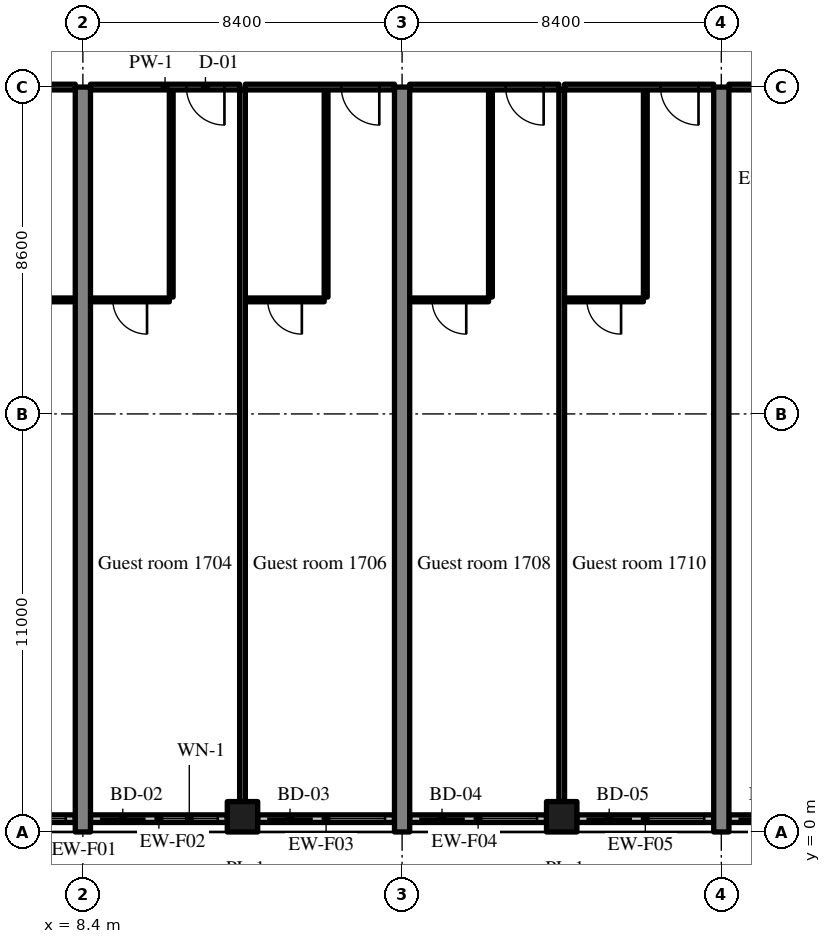
"""IFC4 building model, lengths in metres.
Left out: names, types, materials, properties, quantities, classifications, styles, units other than length and angle.
Written with IfcOpenShell. Run it as: python <this file> out.ifc"""

import sys

from ifc_helpers import new_model, si_unit, direction, frame, frame_2d, origin, origin_2d, place, context, subcontext, project, spatial, rectangle, extrude, source, transform, mapped, element, fill, save


model = new_model("IFC4")
c1 = context("Model", 3, precision=1e-05, world=origin(), true_north=direction((0.0, 1.0)))
c2 = subcontext(c1, "Body", "Model", "MODEL_VIEW")
j1 = project(units=[si_unit("LENGTHUNIT", "METRE"), si_unit("PLANEANGLEUNIT", "RADIAN")], contexts=[c1])
p1 = place(None, origin())
s1 = spatial("IfcSite", under=j1, at=p1, CompositionType="ELEMENT")
p2 = place(p1, origin())
s2 = spatial("IfcBuilding", under=s1, at=p2, CompositionType="ELEMENT")
p3 = place(p2, frame((0.0, 0.0, 73.4)))
s3 = spatial("IfcBuildingStorey", under=s2, at=p3, CompositionType="ELEMENT", Elevation=73.4)
m1 = source(origin(), c2, "Body", "SweptSolid", [
    extrude(rectangle(XDim=19.6, YDim=0.4, at=frame_2d((9.8, 0.0))), origin(), (0.0, 0.0, 1.0), 3.52),
])
for number, where, z_axis, x_axis in (
    (1, (8.4, 0.0, 0.0), (0.0, 0.0, 1.0), (0.0, 1.0, 0.0)),
    (2, (16.8, 0.0, 0.0), (0.0, 0.0, 1.0), (0.0, 1.0, 0.0)),
    (3, (25.2, 0.0, 0.0), (0.0, 0.0, 1.0), (0.0, 1.0, 0.0)),
):
    element("IfcWall", number, at=place(p3, frame(where, z_axis=z_axis, x_axis=x_axis)), inside=s3, PredefinedType="SHEAR", context=c2, shape_type="MappedRepresentation", body=[
        mapped(m1, transform((0.0, 0.0, 0.0), scale=1.0)),
    ])
m2 = source(origin(), c2, "Body", "SweptSolid", [
    extrude(rectangle(XDim=0.8, YDim=0.8, at=origin_2d()), origin(), (0.0, 0.0, 1.0), 3.52),
])
for number, where, z_axis, x_axis in (
    (4, (12.6, 0.4, 0.0), (0.0, 0.0, 1.0), (1.0, 0.0, 0.0)),
    (5, (21.0, 0.4, 0.0), (0.0, 0.0, 1.0), (1.0, 0.0, 0.0)),
):
    element("IfcColumn", number, at=place(p3, frame(where, z_axis=z_axis, x_axis=x_axis)), inside=s3, PredefinedType="COLUMN", context=c2, shape_type="MappedRepresentation", body=[
        mapped(m2, transform((0.0, 0.0, 0.0), scale=1.0)),
    ])
m3 = source(origin(), c2, "Body", "SweptSolid", [
    extrude(rectangle(XDim=4.055, YDim=0.2, at=frame_2d((2.027, 0.0))), origin(), (0.0, 0.0, 1.0), 2.82),
])
p4 = place(p3, frame((4.145, 0.35, 0.0), z_axis=(0.0, 0.0, 1.0), x_axis=(1.0, 0.0, 0.0)))
e6 = element("IfcWall", 6, at=p4, inside=s3, PredefinedType="SOLIDWALL", context=c2, shape_type="MappedRepresentation", body=[
    mapped(m3, transform((0.0, 0.0, 0.0), scale=1.0)),
])
m4 = source(origin(), c2, "Body", "SweptSolid", [
    extrude(rectangle(XDim=1.2, YDim=2.4, at=frame_2d((0.6, 1.2))), frame((0.0, 0.11, 0.0), z_axis=(0.0, -1.0, 0.0), x_axis=(1.0, 0.0, 0.0)), (0.0, 0.0, 1.0), 0.22),
])
p5 = place(p4, frame((0.25, 0.0, 0.0)))
e7 = element("IfcOpeningElement", 7, at=p5, cuts=e6, PredefinedType="OPENING", context=c2, shape_type="MappedRepresentation", body=[
    mapped(m4, transform((0.0, 0.0, 0.0), scale=1.0)),
])
m5 = source(origin(), c2, "Body", "SweptSolid", [
    extrude(rectangle(XDim=1.5, YDim=1.5, at=frame_2d((0.75, 0.75))), frame((0.0, 0.11, 0.0), z_axis=(0.0, -1.0, 0.0), x_axis=(1.0, 0.0, 0.0)), (0.0, 0.0, 1.0), 0.22),
])
p6 = place(p4, frame((2.305, 0.0, 0.9)))
e8 = element("IfcOpeningElement", 8, at=p6, cuts=e6, PredefinedType="OPENING", context=c2, shape_type="MappedRepresentation", body=[
    mapped(m5, transform((0.0, 0.0, 0.0), scale=1.0)),
])
m6 = source(origin(), c2, "Body", "SweptSolid", [
    extrude(rectangle(XDim=3.6, YDim=0.2, at=frame_2d((1.8, 0.0))), origin(), (0.0, 0.0, 1.0), 2.82),
])
p7 = place(p3, frame((8.6, 0.35, 0.0), z_axis=(0.0, 0.0, 1.0), x_axis=(1.0, 0.0, 0.0)))
e9 = element("IfcWall", 9, at=p7, inside=s3, PredefinedType="SOLIDWALL", context=c2, shape_type="MappedRepresentation", body=[
    mapped(m6, transform((0.0, 0.0, 0.0), scale=1.0)),
])
p8 = place(p7, frame((0.25, 0.0, 0.0)))
e10 = element("IfcOpeningElement", 10, at=p8, cuts=e9, PredefinedType="OPENING", context=c2, shape_type="MappedRepresentation", body=[
    mapped(m4, transform((0.0, 0.0, 0.0), scale=1.0)),
])
p9 = place(p7, frame((1.85, 0.0, 0.9)))
e11 = element("IfcOpeningElement", 11, at=p9, cuts=e9, PredefinedType="OPENING", context=c2, shape_type="MappedRepresentation", body=[
    mapped(m5, transform((0.0, 0.0, 0.0), scale=1.0)),
])
m7 = source(origin(), c2, "Body", "SweptSolid", [
    extrude(rectangle(XDim=3.6, YDim=0.2, at=frame_2d((1.8, 0.0))), origin(), (0.0, 0.0, 1.0), 2.82),
])
p10 = place(p3, frame((13.0, 0.35, 0.0), z_axis=(0.0, 0.0, 1.0), x_axis=(1.0, 0.0, 0.0)))
e12 = element("IfcWall", 12, at=p10, inside=s3, PredefinedType="SOLIDWALL", context=c2, shape_type="MappedRepresentation", body=[
    mapped(m7, transform((0.0, 0.0, 0.0), scale=1.0)),
])
p11 = place(p10, frame((0.25, 0.0, 0.0)))
e13 = element("IfcOpeningElement", 13, at=p11, cuts=e12, PredefinedType="OPENING", context=c2, shape_type="MappedRepresentation", body=[
    mapped(m4, transform((0.0, 0.0, 0.0), scale=1.0)),
])
p12 = place(p10, frame((1.85, 0.0, 0.9)))
e14 = element("IfcOpeningElement", 14, at=p12, cuts=e12, PredefinedType="OPENING", context=c2, shape_type="MappedRepresentation", body=[
    mapped(m5, transform((0.0, 0.0, 0.0), scale=1.0)),
])
p13 = place(p3, frame((17.0, 0.35, 0.0), z_axis=(0.0, 0.0, 1.0), x_axis=(1.0, 0.0, 0.0)))
e15 = element("IfcWall", 15, at=p13, inside=s3, PredefinedType="SOLIDWALL", context=c2, shape_type="MappedRepresentation", body=[
    mapped(m7, transform((0.0, 0.0, 0.0), scale=1.0)),
])
p14 = place(p13, frame((0.25, 0.0, 0.0)))
e16 = element("IfcOpeningElement", 16, at=p14, cuts=e15, PredefinedType="OPENING", context=c2, shape_type="MappedRepresentation", body=[
    mapped(m4, transform((0.0, 0.0, 0.0), scale=1.0)),
])
p15 = place(p13, frame((1.85, 0.0, 0.9)))
e17 = element("IfcOpeningElement", 17, at=p15, cuts=e15, PredefinedType="OPENING", context=c2, shape_type="MappedRepresentation", body=[
    mapped(m5, transform((0.0, 0.0, 0.0), scale=1.0)),
])
p16 = place(p3, frame((21.4, 0.35, 0.0), z_axis=(0.0, 0.0, 1.0), x_axis=(1.0, 0.0, 0.0)))
e18 = element("IfcWall", 18, at=p16, inside=s3, PredefinedType="SOLIDWALL", context=c2, shape_type="MappedRepresentation", body=[
    mapped(m7, transform((0.0, 0.0, 0.0), scale=1.0)),
])
p17 = place(p16, frame((0.25, 0.0, 0.0)))
e19 = element("IfcOpeningElement", 19, at=p17, cuts=e18, PredefinedType="OPENING", context=c2, shape_type="MappedRepresentation", body=[
    mapped(m4, transform((0.0, 0.0, 0.0), scale=1.0)),
])
p18 = place(p16, frame((1.85, 0.0, 0.9)))
e20 = element("IfcOpeningElement", 20, at=p18, cuts=e18, PredefinedType="OPENING", context=c2, shape_type="MappedRepresentation", body=[
    mapped(m5, transform((0.0, 0.0, 0.0), scale=1.0)),
])
p19 = place(p3, frame((25.4, 0.35, 0.0), z_axis=(0.0, 0.0, 1.0), x_axis=(1.0, 0.0, 0.0)))
e21 = element("IfcWall", 21, at=p19, inside=s3, PredefinedType="SOLIDWALL", context=c2, shape_type="MappedRepresentation", body=[
    mapped(m7, transform((0.0, 0.0, 0.0), scale=1.0)),
])
p20 = place(p19, frame((0.25, 0.0, 0.0)))
e22 = element("IfcOpeningElement", 22, at=p20, cuts=e21, PredefinedType="OPENING", context=c2, shape_type="MappedRepresentation", body=[
    mapped(m4, transform((0.0, 0.0, 0.0), scale=1.0)),
])
p21 = place(p19, frame((1.85, 0.0, 0.9)))
e23 = element("IfcOpeningElement", 23, at=p21, cuts=e21, PredefinedType="OPENING", context=c2, shape_type="MappedRepresentation", body=[
    mapped(m5, transform((0.0, 0.0, 0.0), scale=1.0)),
])
m8 = source(origin(), c2, "Body", "SweptSolid", [
    extrude(rectangle(XDim=2.35, YDim=0.1, at=frame_2d((1.175, 0.0))), origin(), (0.0, 0.0, 1.0), 3.52),
])
p22 = place(p3, frame((5.85, 14.0, 0.0), z_axis=(0.0, 0.0, 1.0), x_axis=(1.0, 0.0, 0.0)))
e24 = element("IfcWall", 24, at=p22, inside=s3, PredefinedType="PARTITIONING", context=c2, shape_type="MappedRepresentation", body=[
    mapped(m8, transform((0.0, 0.0, 0.0), scale=1.0)),
])
m9 = source(origin(), c2, "Body", "SweptSolid", [
    extrude(rectangle(XDim=0.9, YDim=2.1, at=frame_2d((0.45, 1.05))), frame((0.0, 0.06, 0.0), z_axis=(0.0, -1.0, 0.0), x_axis=(1.0, 0.0, 0.0)), (0.0, 0.0, 1.0), 0.12),
])
p23 = place(p22, frame((0.725, 0.0, 0.0)))
e25 = element("IfcOpeningElement", 25, at=p23, cuts=e24, PredefinedType="OPENING", context=c2, shape_type="MappedRepresentation", body=[
    mapped(m9, transform((0.0, 0.0, 0.0), scale=1.0)),
])
m10 = source(origin(), c2, "Body", "SweptSolid", [
    extrude(rectangle(XDim=7.8, YDim=0.15, at=frame_2d((3.9, 0.0))), origin(), (0.0, 0.0, 1.0), 2.82),
])
p24 = place(p3, frame((0.4, 19.6, 0.0), z_axis=(0.0, 0.0, 1.0), x_axis=(1.0, 0.0, 0.0)))
e26 = element("IfcWall", 26, at=p24, inside=s3, PredefinedType="PARTITIONING", context=c2, shape_type="MappedRepresentation", body=[
    mapped(m10, transform((0.0, 0.0, 0.0), scale=1.0)),
])
m11 = source(origin(), c2, "Body", "SweptSolid", [
    extrude(rectangle(XDim=1.0, YDim=2.1, at=frame_2d((0.5, 1.05))), frame((0.0, 0.085, 0.0), z_axis=(0.0, -1.0, 0.0), x_axis=(1.0, 0.0, 0.0)), (0.0, 0.0, 1.0), 0.17),
])
p25 = place(p24, frame((0.4, 0.0, 0.0)))
e27 = element("IfcOpeningElement", 27, at=p25, cuts=e26, PredefinedType="OPENING", context=c2, shape_type="MappedRepresentation", body=[
    mapped(m11, transform((0.0, 0.0, 0.0), scale=1.0)),
])
m12 = source(origin(), c2, "Body", "SweptSolid", [
    extrude(rectangle(XDim=5.45, YDim=0.1, at=frame_2d((2.725, 0.0))), origin(), (0.0, 0.0, 1.0), 3.52),
])
p26 = place(p3, frame((10.725, 14.075, 0.0), z_axis=(0.0, 0.0, 1.0), x_axis=(0.0, 1.0, 0.0)))
e28 = element("IfcWall", 28, at=p26, inside=s3, PredefinedType="PARTITIONING", context=c2, shape_type="MappedRepresentation", body=[
    mapped(m12, transform((0.0, 0.0, 0.0), scale=1.0)),
])
m13 = source(origin(), c2, "Body", "SweptSolid", [
    extrude(rectangle(XDim=2.075, YDim=0.1, at=frame_2d((1.038, 0.0))), origin(), (0.0, 0.0, 1.0), 3.52),
])
p27 = place(p3, frame((8.6, 14.0, 0.0), z_axis=(0.0, 0.0, 1.0), x_axis=(1.0, 0.0, 0.0)))
e29 = element("IfcWall", 29, at=p27, inside=s3, PredefinedType="PARTITIONING", context=c2, shape_type="MappedRepresentation", body=[
    mapped(m13, transform((0.0, 0.0, 0.0), scale=1.0)),
])
p28 = place(p27, frame((0.588, 0.0, 0.0)))
e30 = element("IfcOpeningElement", 30, at=p28, cuts=e29, PredefinedType="OPENING", context=c2, shape_type="MappedRepresentation", body=[
    mapped(m9, transform((0.0, 0.0, 0.0), scale=1.0)),
])
m14 = source(origin(), c2, "Body", "SweptSolid", [
    extrude(rectangle(XDim=3.925, YDim=0.15, at=frame_2d((1.962, 0.0))), origin(), (0.0, 0.0, 1.0), 2.82),
])
p29 = place(p3, frame((8.6, 19.6, 0.0), z_axis=(0.0, 0.0, 1.0), x_axis=(1.0, 0.0, 0.0)))
e31 = element("IfcWall", 31, at=p29, inside=s3, PredefinedType="PARTITIONING", context=c2, shape_type="MappedRepresentation", body=[
    mapped(m14, transform((0.0, 0.0, 0.0), scale=1.0)),
])
p30 = place(p29, frame((2.525, 0.0, 0.0)))
e32 = element("IfcOpeningElement", 32, at=p30, cuts=e31, PredefinedType="OPENING", context=c2, shape_type="MappedRepresentation", body=[
    mapped(m11, transform((0.0, 0.0, 0.0), scale=1.0)),
])
p31 = place(p3, frame((14.8, 14.075, 0.0), z_axis=(0.0, 0.0, 1.0), x_axis=(0.0, 1.0, 0.0)))
e33 = element("IfcWall", 33, at=p31, inside=s3, PredefinedType="PARTITIONING", context=c2, shape_type="MappedRepresentation", body=[
    mapped(m12, transform((0.0, 0.0, 0.0), scale=1.0)),
])
p32 = place(p3, frame((12.675, 14.0, 0.0), z_axis=(0.0, 0.0, 1.0), x_axis=(1.0, 0.0, 0.0)))
e34 = element("IfcWall", 34, at=p32, inside=s3, PredefinedType="PARTITIONING", context=c2, shape_type="MappedRepresentation", body=[
    mapped(m13, transform((0.0, 0.0, 0.0), scale=1.0)),
])
p33 = place(p32, frame((0.587, 0.0, 0.0)))
e35 = element("IfcOpeningElement", 35, at=p33, cuts=e34, PredefinedType="OPENING", context=c2, shape_type="MappedRepresentation", body=[
    mapped(m9, transform((0.0, 0.0, 0.0), scale=1.0)),
])
m15 = source(origin(), c2, "Body", "SweptSolid", [
    extrude(rectangle(XDim=3.925, YDim=0.15, at=frame_2d((1.962, 0.0))), origin(), (0.0, 0.0, 1.0), 2.82),
])
p34 = place(p3, frame((12.675, 19.6, 0.0), z_axis=(0.0, 0.0, 1.0), x_axis=(1.0, 0.0, 0.0)))
e36 = element("IfcWall", 36, at=p34, inside=s3, PredefinedType="PARTITIONING", context=c2, shape_type="MappedRepresentation", body=[
    mapped(m15, transform((0.0, 0.0, 0.0), scale=1.0)),
])
p35 = place(p34, frame((2.525, 0.0, 0.0)))
e37 = element("IfcOpeningElement", 37, at=p35, cuts=e36, PredefinedType="OPENING", context=c2, shape_type="MappedRepresentation", body=[
    mapped(m11, transform((0.0, 0.0, 0.0), scale=1.0)),
])
m16 = source(origin(), c2, "Body", "SweptSolid", [
    extrude(rectangle(XDim=18.725, YDim=0.15, at=frame_2d((9.362, 0.0))), origin(), (0.0, 0.0, 1.0), 3.52),
])
p36 = place(p3, frame((12.6, 0.8, 0.0), z_axis=(0.0, 0.0, 1.0), x_axis=(0.0, 1.0, 0.0)))
e38 = element("IfcWall", 38, at=p36, inside=s3, PredefinedType="PARTITIONING", context=c2, shape_type="MappedRepresentation", body=[
    mapped(m16, transform((0.0, 0.0, 0.0), scale=1.0)),
])
p37 = place(p3, frame((19.125, 14.075, 0.0), z_axis=(0.0, 0.0, 1.0), x_axis=(0.0, 1.0, 0.0)))
e39 = element("IfcWall", 39, at=p37, inside=s3, PredefinedType="PARTITIONING", context=c2, shape_type="MappedRepresentation", body=[
    mapped(m12, transform((0.0, 0.0, 0.0), scale=1.0)),
])
p38 = place(p3, frame((17.0, 14.0, 0.0), z_axis=(0.0, 0.0, 1.0), x_axis=(1.0, 0.0, 0.0)))
e40 = element("IfcWall", 40, at=p38, inside=s3, PredefinedType="PARTITIONING", context=c2, shape_type="MappedRepresentation", body=[
    mapped(m13, transform((0.0, 0.0, 0.0), scale=1.0)),
])
p39 = place(p38, frame((0.588, 0.0, 0.0)))
e41 = element("IfcOpeningElement", 41, at=p39, cuts=e40, PredefinedType="OPENING", context=c2, shape_type="MappedRepresentation", body=[
    mapped(m9, transform((0.0, 0.0, 0.0), scale=1.0)),
])
p40 = place(p3, frame((17.0, 19.6, 0.0), z_axis=(0.0, 0.0, 1.0), x_axis=(1.0, 0.0, 0.0)))
e42 = element("IfcWall", 42, at=p40, inside=s3, PredefinedType="PARTITIONING", context=c2, shape_type="MappedRepresentation", body=[
    mapped(m15, transform((0.0, 0.0, 0.0), scale=1.0)),
])
p41 = place(p40, frame((2.525, 0.0, 0.0)))
e43 = element("IfcOpeningElement", 43, at=p41, cuts=e42, PredefinedType="OPENING", context=c2, shape_type="MappedRepresentation", body=[
    mapped(m11, transform((0.0, 0.0, 0.0), scale=1.0)),
])
p42 = place(p3, frame((23.2, 14.075, 0.0), z_axis=(0.0, 0.0, 1.0), x_axis=(0.0, 1.0, 0.0)))
e44 = element("IfcWall", 44, at=p42, inside=s3, PredefinedType="PARTITIONING", context=c2, shape_type="MappedRepresentation", body=[
    mapped(m12, transform((0.0, 0.0, 0.0), scale=1.0)),
])
p43 = place(p3, frame((21.075, 14.0, 0.0), z_axis=(0.0, 0.0, 1.0), x_axis=(1.0, 0.0, 0.0)))
e45 = element("IfcWall", 45, at=p43, inside=s3, PredefinedType="PARTITIONING", context=c2, shape_type="MappedRepresentation", body=[
    mapped(m13, transform((0.0, 0.0, 0.0), scale=1.0)),
])
p44 = place(p43, frame((0.587, 0.0, 0.0)))
e46 = element("IfcOpeningElement", 46, at=p44, cuts=e45, PredefinedType="OPENING", context=c2, shape_type="MappedRepresentation", body=[
    mapped(m9, transform((0.0, 0.0, 0.0), scale=1.0)),
])
p45 = place(p3, frame((21.075, 19.6, 0.0), z_axis=(0.0, 0.0, 1.0), x_axis=(1.0, 0.0, 0.0)))
e47 = element("IfcWall", 47, at=p45, inside=s3, PredefinedType="PARTITIONING", context=c2, shape_type="MappedRepresentation", body=[
    mapped(m15, transform((0.0, 0.0, 0.0), scale=1.0)),
])
p46 = place(p45, frame((2.525, 0.0, 0.0)))
e48 = element("IfcOpeningElement", 48, at=p46, cuts=e47, PredefinedType="OPENING", context=c2, shape_type="MappedRepresentation", body=[
    mapped(m11, transform((0.0, 0.0, 0.0), scale=1.0)),
])
p47 = place(p3, frame((21.0, 0.8, 0.0), z_axis=(0.0, 0.0, 1.0), x_axis=(0.0, 1.0, 0.0)))
e49 = element("IfcWall", 49, at=p47, inside=s3, PredefinedType="PARTITIONING", context=c2, shape_type="MappedRepresentation", body=[
    mapped(m16, transform((0.0, 0.0, 0.0), scale=1.0)),
])
p48 = place(p3, frame((25.4, 19.6, 0.0), z_axis=(0.0, 0.0, 1.0), x_axis=(1.0, 0.0, 0.0)))
e50 = element("IfcWall", 50, at=p48, inside=s3, PredefinedType="PARTITIONING", context=c2, shape_type="MappedRepresentation", body=[
    mapped(m15, transform((0.0, 0.0, 0.0), scale=1.0)),
])
p49 = place(p48, frame((1.462, 0.0, 0.0)))
e51 = element("IfcOpeningElement", 51, at=p49, cuts=e50, PredefinedType="OPENING", context=c2, shape_type="MappedRepresentation", body=[
    mapped(m11, transform((0.0, 0.0, 0.0), scale=1.0)),
])
m17 = source(origin(), c2, "Body", "SweptSolid", [
    extrude(rectangle(XDim=1.5, YDim=1.5, at=frame_2d((0.75, 0.75))), frame((0.0, 0.03, 0.0), z_axis=(0.0, -1.0, 0.0), x_axis=(1.0, 0.0, 0.0)), (0.0, 0.0, 1.0), 0.06),
])
p50 = place(p6, origin())
e52 = element("IfcWindow", 52, at=p50, inside=s3, PartitioningType="SINGLE_PANEL", PredefinedType="WINDOW", context=c2, shape_type="MappedRepresentation", body=[
    mapped(m17, transform((0.0, 0.0, 0.0), scale=1.0)),
])
fill(e8, e52)
m18 = source(origin(), c2, "Body", "SweptSolid", [
    extrude(rectangle(XDim=1.2, YDim=2.4, at=frame_2d((0.6, 1.2))), frame((0.0, 0.025, 0.0), z_axis=(0.0, -1.0, 0.0), x_axis=(1.0, 0.0, 0.0)), (0.0, 0.0, 1.0), 0.05),
])
p51 = place(p8, origin())
e53 = element("IfcDoor", 53, at=p51, inside=s3, OperationType="SLIDING_TO_RIGHT", PredefinedType="DOOR", context=c2, shape_type="MappedRepresentation", body=[
    mapped(m18, transform((0.0, 0.0, 0.0), scale=1.0)),
])
fill(e10, e53)
p52 = place(p9, origin())
e54 = element("IfcWindow", 54, at=p52, inside=s3, PartitioningType="SINGLE_PANEL", PredefinedType="WINDOW", context=c2, shape_type="MappedRepresentation", body=[
    mapped(m17, transform((0.0, 0.0, 0.0), scale=1.0)),
])
fill(e11, e54)
p53 = place(p11, origin())
e55 = element("IfcDoor", 55, at=p53, inside=s3, OperationType="SLIDING_TO_LEFT", PredefinedType="DOOR", context=c2, shape_type="MappedRepresentation", body=[
    mapped(m18, transform((0.0, 0.0, 0.0), scale=1.0)),
])
fill(e13, e55)
p54 = place(p12, origin())
e56 = element("IfcWindow", 56, at=p54, inside=s3, PartitioningType="SINGLE_PANEL", PredefinedType="WINDOW", context=c2, shape_type="MappedRepresentation", body=[
    mapped(m17, transform((0.0, 0.0, 0.0), scale=1.0)),
])
fill(e14, e56)
p55 = place(p14, origin())
e57 = element("IfcDoor", 57, at=p55, inside=s3, OperationType="SLIDING_TO_RIGHT", PredefinedType="DOOR", context=c2, shape_type="MappedRepresentation", body=[
    mapped(m18, transform((0.0, 0.0, 0.0), scale=1.0)),
])
fill(e16, e57)
p56 = place(p15, origin())
e58 = element("IfcWindow", 58, at=p56, inside=s3, PartitioningType="SINGLE_PANEL", PredefinedType="WINDOW", context=c2, shape_type="MappedRepresentation", body=[
    mapped(m17, transform((0.0, 0.0, 0.0), scale=1.0)),
])
fill(e17, e58)
p57 = place(p17, origin())
e59 = element("IfcDoor", 59, at=p57, inside=s3, OperationType="SLIDING_TO_LEFT", PredefinedType="DOOR", context=c2, shape_type="MappedRepresentation", body=[
    mapped(m18, transform((0.0, 0.0, 0.0), scale=1.0)),
])
fill(e19, e59)
p58 = place(p18, origin())
e60 = element("IfcWindow", 60, at=p58, inside=s3, PartitioningType="SINGLE_PANEL", PredefinedType="WINDOW", context=c2, shape_type="MappedRepresentation", body=[
    mapped(m17, transform((0.0, 0.0, 0.0), scale=1.0)),
])
fill(e20, e60)
p59 = place(p20, origin())
e61 = element("IfcDoor", 61, at=p59, inside=s3, OperationType="SLIDING_TO_RIGHT", PredefinedType="DOOR", context=c2, shape_type="MappedRepresentation", body=[
    mapped(m18, transform((0.0, 0.0, 0.0), scale=1.0)),
])
fill(e22, e61)
m19 = source(origin(), c2, "Body", "SweptSolid", [
    extrude(rectangle(XDim=0.9, YDim=2.1, at=frame_2d((0.45, 1.05))), frame((0.0, 0.025, 0.0), z_axis=(0.0, -1.0, 0.0), x_axis=(1.0, 0.0, 0.0)), (0.0, 0.0, 1.0), 0.05),
])
p60 = place(p28, origin())
e62 = element("IfcDoor", 62, at=p60, inside=s3, OperationType="SINGLE_SWING_RIGHT", PredefinedType="DOOR", context=c2, shape_type="MappedRepresentation", body=[
    mapped(m19, transform((0.0, 0.0, 0.0), scale=1.0)),
])
fill(e30, e62)
m20 = source(origin(), c2, "Body", "SweptSolid", [
    extrude(rectangle(XDim=1.0, YDim=2.1, at=frame_2d((0.5, 1.05))), frame((0.0, 0.025, 0.0), z_axis=(0.0, -1.0, 0.0), x_axis=(1.0, 0.0, 0.0)), (0.0, 0.0, 1.0), 0.05),
])
p61 = place(p30, origin())
e63 = element("IfcDoor", 63, at=p61, inside=s3, OperationType="SINGLE_SWING_RIGHT", PredefinedType="DOOR", context=c2, shape_type="MappedRepresentation", body=[
    mapped(m20, transform((0.0, 0.0, 0.0), scale=1.0)),
])
fill(e32, e63)
p62 = place(p33, origin())
e64 = element("IfcDoor", 64, at=p62, inside=s3, OperationType="SINGLE_SWING_RIGHT", PredefinedType="DOOR", context=c2, shape_type="MappedRepresentation", body=[
    mapped(m19, transform((0.0, 0.0, 0.0), scale=1.0)),
])
fill(e35, e64)
p63 = place(p35, origin())
e65 = element("IfcDoor", 65, at=p63, inside=s3, OperationType="SINGLE_SWING_RIGHT", PredefinedType="DOOR", context=c2, shape_type="MappedRepresentation", body=[
    mapped(m20, transform((0.0, 0.0, 0.0), scale=1.0)),
])
fill(e37, e65)
p64 = place(p39, origin())
e66 = element("IfcDoor", 66, at=p64, inside=s3, OperationType="SINGLE_SWING_RIGHT", PredefinedType="DOOR", context=c2, shape_type="MappedRepresentation", body=[
    mapped(m19, transform((0.0, 0.0, 0.0), scale=1.0)),
])
fill(e41, e66)
p65 = place(p41, origin())
e67 = element("IfcDoor", 67, at=p65, inside=s3, OperationType="SINGLE_SWING_RIGHT", PredefinedType="DOOR", context=c2, shape_type="MappedRepresentation", body=[
    mapped(m20, transform((0.0, 0.0, 0.0), scale=1.0)),
])
fill(e43, e67)
p66 = place(p44, origin())
e68 = element("IfcDoor", 68, at=p66, inside=s3, OperationType="SINGLE_SWING_RIGHT", PredefinedType="DOOR", context=c2, shape_type="MappedRepresentation", body=[
    mapped(m19, transform((0.0, 0.0, 0.0), scale=1.0)),
])
fill(e46, e68)
p67 = place(p46, origin())
e69 = element("IfcDoor", 69, at=p67, inside=s3, OperationType="SINGLE_SWING_RIGHT", PredefinedType="DOOR", context=c2, shape_type="MappedRepresentation", body=[
    mapped(m20, transform((0.0, 0.0, 0.0), scale=1.0)),
])
fill(e48, e69)
save(model, sys.argv[1])
